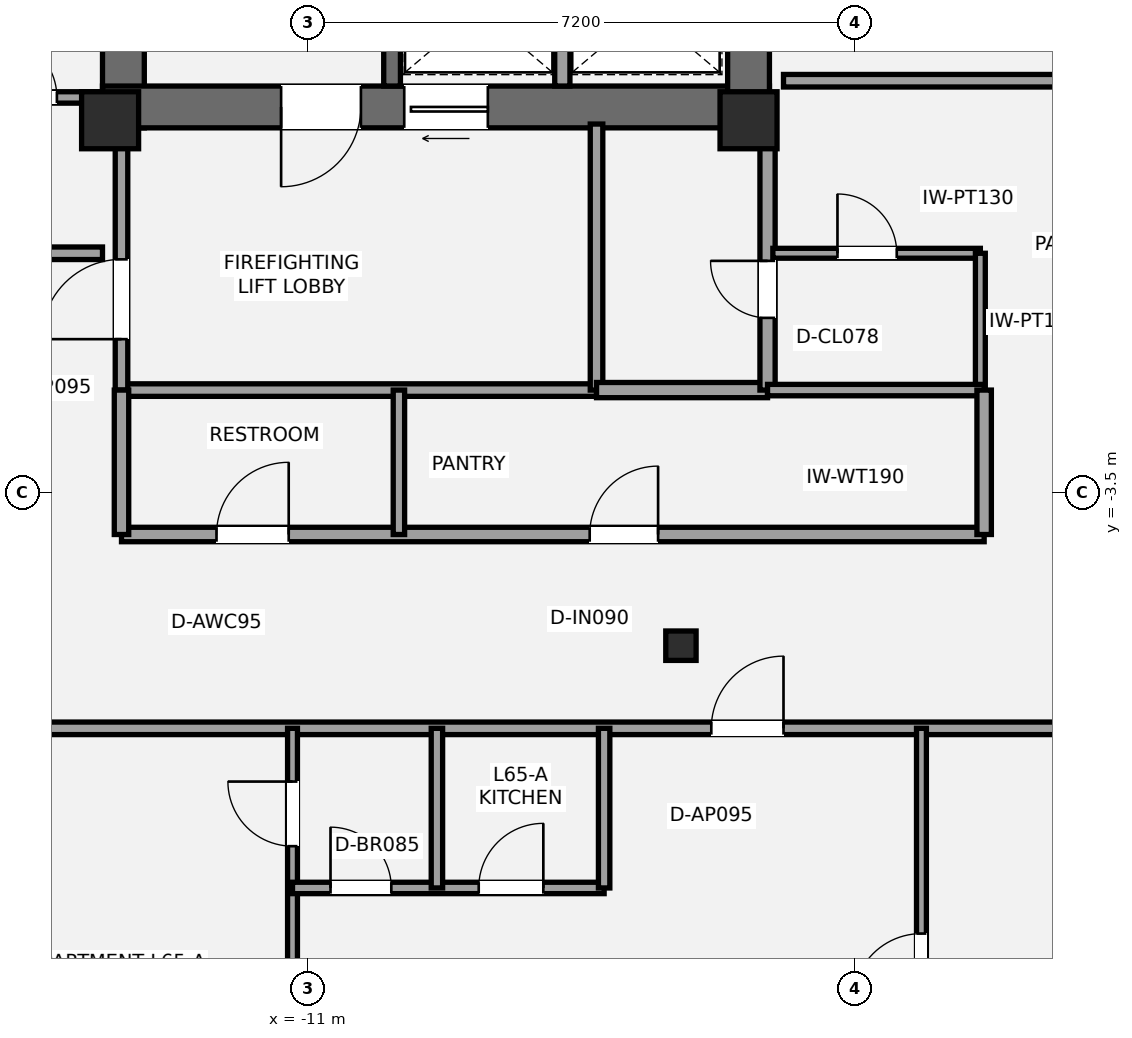
"""IFC4 building model, lengths in metres.
Left out: names, types, materials, properties, quantities, classifications, styles, units other than length and angle.
Written with IfcOpenShell. Run it as: python <this file> out.ifc"""

import sys

from ifc_helpers import new_model, si_unit, direction, frame, frame_2d, origin, origin_2d, place, context, subcontext, project, spatial, rectangle, i_section, extrude, element, fill, save


model = new_model("IFC4")
c1 = context("Model", 3, precision=1e-05, world=origin(), true_north=direction((0.0, 1.0)))
c2 = subcontext(c1, "Body", "Model", "MODEL_VIEW")
j1 = project(units=[si_unit("LENGTHUNIT", "METRE"), si_unit("PLANEANGLEUNIT", "RADIAN")], contexts=[c1])
p1 = place(None, origin())
s1 = spatial("IfcSite", under=j1, at=p1, CompositionType="ELEMENT")
p2 = place(p1, origin())
s2 = spatial("IfcBuilding", under=s1, at=p2, CompositionType="ELEMENT")
p3 = place(p2, frame((0.0, 0.0, 232.05)))
s3 = spatial("IfcBuildingStorey", under=s2, at=p3, CompositionType="ELEMENT", Elevation=232.05)
p4 = place(p3, frame((-13.425, 1.3, 0.0), z_axis=(0.0, 0.0, 1.0), x_axis=(0.0, 1.0, 0.0)))
e1 = element("IfcWall", 1, at=p4, inside=s3, PredefinedType="SHEAR", context=c2, shape_type="SweptSolid", body=[
    extrude(rectangle(XDim=8.25, YDim=0.55, at=frame_2d((4.125, 0.0))), origin(), (0.0, 0.0, 1.0), 3.15),
])
p5 = place(p3, frame((-4.925, 1.575, 0.0), z_axis=(0.0, 0.0, 1.0), x_axis=(-1.0, 0.0, 0.0)))
e2 = element("IfcWall", 2, at=p5, inside=s3, PredefinedType="SHEAR", context=c2, shape_type="SweptSolid", body=[
    extrude(rectangle(XDim=8.775, YDim=0.55, at=frame_2d((4.387, 0.0))), origin(), (0.0, 0.0, 1.0), 3.15),
])
p6 = place(p5, frame((5.375, 0.0, 0.0)))
e3 = element("IfcOpeningElement", 3, at=p6, cuts=e2, PredefinedType="OPENING", context=c2, shape_type="SweptSolid", body=[
    extrude(rectangle(XDim=1.05, YDim=2.15, at=frame_2d((0.525, 1.075))), frame((0.0, 0.285, 0.0), z_axis=(0.0, -1.0, 0.0), x_axis=(1.0, 0.0, 0.0)), (0.0, 0.0, 1.0), 0.57),
])
p7 = place(p5, frame((3.705, 0.0, 0.0)))
e4 = element("IfcOpeningElement", 4, at=p7, cuts=e2, PredefinedType="OPENING", context=c2, shape_type="SweptSolid", body=[
    extrude(rectangle(XDim=1.1, YDim=2.2, at=frame_2d((0.55, 1.1))), frame((0.0, 0.285, 0.0), z_axis=(0.0, -1.0, 0.0), x_axis=(1.0, 0.0, 0.0)), (0.0, 0.0, 1.0), 0.57),
])
p8 = place(p3, frame((-5.2, 1.3, 0.0), z_axis=(0.0, 0.0, 1.0), x_axis=(0.0, 1.0, 0.0)))
e5 = element("IfcWall", 5, at=p8, inside=s3, PredefinedType="SHEAR", context=c2, shape_type="SweptSolid", body=[
    extrude(rectangle(XDim=2.5, YDim=0.55, at=frame_2d((1.25, 0.0))), origin(), (0.0, 0.0, 1.0), 3.15),
])
p9 = place(p3, frame((-9.89, 1.85, 0.0), z_axis=(0.0, 0.0, 1.0), x_axis=(0.0, 1.0, 0.0)))
e6 = element("IfcWall", 6, at=p9, inside=s3, PredefinedType="SHEAR", context=c2, shape_type="SweptSolid", body=[
    extrude(rectangle(XDim=7.15, YDim=0.22, at=frame_2d((3.575, 0.0))), origin(), (0.0, 0.0, 1.0), 3.15),
])
for number, where, z_axis, x_axis in (
    (7, (-13.6, 1.4, 0.0), (0.0, 0.0, 1.0), (1.0, 0.0, 0.0)),
    (8, (-5.2, 1.4, 0.0), (0.0, 0.0, 1.0), (1.0, 0.0, 0.0)),
):
    element("IfcColumn", number, at=place(p3, frame(where, z_axis=z_axis, x_axis=x_axis)), inside=s3, PredefinedType="PILASTER", context=c2, shape_type="SweptSolid", body=[
        extrude(rectangle(XDim=0.75, YDim=0.75, at=origin_2d()), origin(), (0.0, 0.0, 1.0), 3.15),
    ])
p10 = place(p3, frame((-6.09, -5.513, 0.0), z_axis=(0.0, 0.0, 1.0), x_axis=(1.0, 0.0, 0.0)))
e9 = element("IfcColumn", 9, at=p10, inside=s3, PredefinedType="COLUMN", context=c2, shape_type="SweptSolid", body=[
    extrude(i_section(OverallWidth=0.399, OverallDepth=0.387, WebThickness=0.021, FlangeThickness=0.033, at=origin_2d()), origin(), (0.0, 0.0, 1.0), 3.15),
])
p11 = place(p3, frame((-14.159, -11.619, 0.0), z_axis=(0.0, 0.0, 1.0), x_axis=(-0.827641205742, 0.56125754744, 0.0)))
e10 = element("IfcWall", 10, at=p11, inside=s3, PredefinedType="STANDARD", context=c2, shape_type="SweptSolid", body=[
    extrude(rectangle(XDim=3.771, YDim=0.44, at=frame_2d((1.885, 0.0))), origin(), (0.0, 0.0, 1.0), 2.336),
])
p12 = place(p11, frame((1.924, 0.0, 0.58)))
e11 = element("IfcOpeningElement", 11, at=p12, cuts=e10, PredefinedType="OPENING", context=c2, shape_type="SweptSolid", body=[
    extrude(rectangle(XDim=1.4, YDim=1.55, at=frame_2d((0.7, 0.775))), frame((0.0, 0.23, 0.0), z_axis=(0.0, -1.0, 0.0), x_axis=(1.0, 0.0, 0.0)), (0.0, 0.0, 1.0), 0.46),
])
p13 = place(p3, frame((-13.45, -2.15, 0.0), z_axis=(0.0, 0.0, 1.0), x_axis=(1.0, 0.0, 0.0)))
e12 = element("IfcWall", 12, at=p13, inside=s3, PredefinedType="PARTITIONING", context=c2, shape_type="SweptSolid", body=[
    extrude(rectangle(XDim=6.25, YDim=0.165, at=frame_2d((3.125, 0.0))), origin(), (0.0, 0.0, 1.0), 2.423),
])
p14 = place(p3, frame((-13.45, -2.15, 0.0), z_axis=(0.0, 0.0, 1.0), x_axis=(0.0, 1.0, 0.0)))
e13 = element("IfcWall", 13, at=p14, inside=s3, PredefinedType="PARTITIONING", context=c2, shape_type="SweptSolid", body=[
    extrude(rectangle(XDim=3.5, YDim=0.165, at=frame_2d((1.75, 0.0))), origin(), (0.0, 0.0, 1.0), 2.423),
])
p15 = place(p14, frame((0.67, 0.0, 0.0)))
e14 = element("IfcOpeningElement", 14, at=p15, cuts=e13, PredefinedType="OPENING", context=c2, shape_type="SweptSolid", body=[
    extrude(rectangle(XDim=1.05, YDim=2.15, at=frame_2d((0.525, 1.075))), frame((0.0, 0.093, 0.0), z_axis=(0.0, -1.0, 0.0), x_axis=(1.0, 0.0, 0.0)), (0.0, 0.0, 1.0), 0.185),
])
p16 = place(p3, frame((-7.2, -2.15, 0.0), z_axis=(0.0, 0.0, 1.0), x_axis=(0.0, 1.0, 0.0)))
e15 = element("IfcWall", 15, at=p16, inside=s3, PredefinedType="PARTITIONING", context=c2, shape_type="SweptSolid", body=[
    extrude(rectangle(XDim=3.5, YDim=0.165, at=frame_2d((1.75, 0.0))), origin(), (0.0, 0.0, 1.0), 2.423),
])
p17 = place(p3, frame((-7.2, -2.15, 0.0), z_axis=(0.0, 0.0, 1.0), x_axis=(1.0, 0.0, 0.0)))
e16 = element("IfcWall", 16, at=p17, inside=s3, PredefinedType="SOLIDWALL", context=c2, shape_type="SweptSolid", body=[
    extrude(rectangle(XDim=2.25, YDim=0.2, at=frame_2d((1.125, 0.0))), origin(), (0.0, 0.0, 1.0), 2.97),
])
p18 = place(p3, frame((-4.95, -2.15, 0.0), z_axis=(0.0, 0.0, 1.0), x_axis=(0.0, 1.0, 0.0)))
e17 = element("IfcWall", 17, at=p18, inside=s3, PredefinedType="SOLIDWALL", context=c2, shape_type="SweptSolid", body=[
    extrude(rectangle(XDim=3.5, YDim=0.2, at=frame_2d((1.75, 0.0))), origin(), (0.0, 0.0, 1.0), 2.423),
])
p19 = place(p18, frame((0.95, 0.0, 0.0)))
e18 = element("IfcOpeningElement", 18, at=p19, cuts=e17, PredefinedType="OPENING", context=c2, shape_type="SweptSolid", body=[
    extrude(rectangle(XDim=0.75, YDim=2.1, at=frame_2d((0.375, 1.05))), frame((0.0, 0.11, 0.0), z_axis=(0.0, -1.0, 0.0), x_axis=(1.0, 0.0, 0.0)), (0.0, 0.0, 1.0), 0.22),
])
p20 = place(p3, frame((-4.88, -0.35, 0.0), z_axis=(0.0, 0.0, 1.0), x_axis=(1.0, 0.0, 0.0)))
e19 = element("IfcWall", 19, at=p20, inside=s3, PredefinedType="PARTITIONING", context=c2, shape_type="SweptSolid", body=[
    extrude(rectangle(XDim=2.73, YDim=0.13, at=frame_2d((1.365, 0.0))), origin(), (0.0, 0.0, 1.0), 2.97),
])
p21 = place(p20, frame((0.85, 0.0, 0.0)))
e20 = element("IfcOpeningElement", 20, at=p21, cuts=e19, PredefinedType="OPENING", context=c2, shape_type="SweptSolid", body=[
    extrude(rectangle(XDim=0.78, YDim=2.1, at=frame_2d((0.39, 1.05))), frame((0.0, 0.075, 0.0), z_axis=(0.0, -1.0, 0.0), x_axis=(1.0, 0.0, 0.0)), (0.0, 0.0, 1.0), 0.15),
])
p22 = place(p3, frame((-2.15, -2.15, 0.0), z_axis=(0.0, 0.0, 1.0), x_axis=(0.0, 1.0, 0.0)))
e21 = element("IfcWall", 21, at=p22, inside=s3, PredefinedType="PARTITIONING", context=c2, shape_type="SweptSolid", body=[
    extrude(rectangle(XDim=1.8, YDim=0.13, at=frame_2d((0.9, 0.0))), origin(), (0.0, 0.0, 1.0), 2.97),
])
p23 = place(p3, frame((-7.65, 1.85, 0.0), z_axis=(0.0, 0.0, 1.0), x_axis=(0.0, 1.0, 0.0)))
e22 = element("IfcWall", 22, at=p23, inside=s3, PredefinedType="SOLIDWALL", context=c2, shape_type="SweptSolid", body=[
    extrude(rectangle(XDim=1.93, YDim=0.2, at=frame_2d((0.965, 0.0))), origin(), (0.0, 0.0, 1.0), 2.97),
])
p24 = place(p3, frame((-4.74, 1.92, 0.0), z_axis=(0.0, 0.0, 1.0), x_axis=(1.0, 0.0, 0.0)))
e23 = element("IfcWall", 23, at=p24, inside=s3, PredefinedType="PARTITIONING", context=c2, shape_type="SweptSolid", body=[
    extrude(rectangle(XDim=3.89, YDim=0.165, at=frame_2d((1.945, 0.0))), origin(), (0.0, 0.0, 1.0), 2.11),
])
p25 = place(p3, frame((-13.45, -4.05, 0.0), z_axis=(0.0, 0.0, 1.0), x_axis=(1.0, 0.0, 0.0)))
e24 = element("IfcWall", 24, at=p25, inside=s3, PredefinedType="PLUMBINGWALL", context=c2, shape_type="SweptSolid", body=[
    extrude(rectangle(XDim=11.35, YDim=0.19, at=frame_2d((5.675, 0.0))), origin(), (0.0, 0.0, 1.0), 2.357),
])
p26 = place(p25, frame((1.25, 0.0, 0.0)))
e25 = element("IfcOpeningElement", 25, at=p26, cuts=e24, PredefinedType="OPENING", context=c2, shape_type="SweptSolid", body=[
    extrude(rectangle(XDim=0.95, YDim=2.15, at=frame_2d((0.475, 1.075))), frame((0.0, 0.105, 0.0), z_axis=(0.0, -1.0, 0.0), x_axis=(1.0, 0.0, 0.0)), (0.0, 0.0, 1.0), 0.21),
])
p27 = place(p25, frame((6.16, 0.0, 0.0)))
e26 = element("IfcOpeningElement", 26, at=p27, cuts=e24, PredefinedType="OPENING", context=c2, shape_type="SweptSolid", body=[
    extrude(rectangle(XDim=0.9, YDim=2.1, at=frame_2d((0.45, 1.05))), frame((0.0, 0.105, 0.0), z_axis=(0.0, -1.0, 0.0), x_axis=(1.0, 0.0, 0.0)), (0.0, 0.0, 1.0), 0.21),
])
p28 = place(p3, frame((-4.95, -2.15, 0.0), z_axis=(0.0, 0.0, 1.0), x_axis=(1.0, 0.0, 0.0)))
e27 = element("IfcWall", 27, at=p28, inside=s3, PredefinedType="PLUMBINGWALL", context=c2, shape_type="SweptSolid", body=[
    extrude(rectangle(XDim=2.85, YDim=0.15, at=frame_2d((1.425, 0.0))), origin(), (0.0, 0.0, 1.0), 2.97),
])
for number, where, z_axis, x_axis in (
    (28, (-13.45, -4.05, 0.0), (0.0, 0.0, 1.0), (0.0, 1.0, 0.0)),
    (29, (-2.1, -4.05, 0.0), (0.0, 0.0, 1.0), (0.0, 1.0, 0.0)),
):
    element("IfcWall", number, at=place(p3, frame(where, z_axis=z_axis, x_axis=x_axis)), inside=s3, PredefinedType="PLUMBINGWALL", context=c2, shape_type="SweptSolid", body=[
        extrude(rectangle(XDim=1.9, YDim=0.19, at=frame_2d((0.95, 0.0))), origin(), (0.0, 0.0, 1.0), 2.423),
    ])
p29 = place(p3, frame((-9.8, -4.05, 0.0), z_axis=(0.0, 0.0, 1.0), x_axis=(0.0, 1.0, 0.0)))
e30 = element("IfcWall", 30, at=p29, inside=s3, PredefinedType="PLUMBINGWALL", context=c2, shape_type="SweptSolid", body=[
    extrude(rectangle(XDim=1.9, YDim=0.15, at=frame_2d((0.95, 0.0))), origin(), (0.0, 0.0, 1.0), 2.97),
])
p30 = place(p3, frame((-19.638, -6.6, 0.0), z_axis=(0.0, 0.0, 1.0), x_axis=(1.0, 0.0, 0.0)))
e31 = element("IfcWall", 31, at=p30, inside=s3, PredefinedType="PARTITIONING", context=c2, shape_type="SweptSolid", body=[
    extrude(rectangle(XDim=39.277, YDim=0.165, at=frame_2d((19.638, 0.0))), origin(), (0.0, 0.0, 1.0), 2.423),
])
p31 = place(p30, frame((1.229, 0.0, 0.0)))
e32 = element("IfcOpeningElement", 32, at=p31, cuts=e31, PredefinedType="OPENING", context=c2, shape_type="SweptSolid", body=[
    extrude(rectangle(XDim=1.0, YDim=2.15, at=frame_2d((0.5, 1.075))), frame((0.0, 0.093, 0.0), z_axis=(0.0, -1.0, 0.0), x_axis=(1.0, 0.0, 0.0)), (0.0, 0.0, 1.0), 0.185),
])
p32 = place(p30, frame((37.393, 0.0, 0.0)))
e33 = element("IfcOpeningElement", 33, at=p32, cuts=e31, PredefinedType="OPENING", context=c2, shape_type="SweptSolid", body=[
    extrude(rectangle(XDim=1.0, YDim=2.15, at=frame_2d((0.5, 1.075))), frame((0.0, 0.093, 0.0), z_axis=(0.0, -1.0, 0.0), x_axis=(1.0, 0.0, 0.0)), (0.0, 0.0, 1.0), 0.185),
])
p33 = place(p30, frame((13.948, 0.0, 0.0)))
e34 = element("IfcOpeningElement", 34, at=p33, cuts=e31, PredefinedType="OPENING", context=c2, shape_type="SweptSolid", body=[
    extrude(rectangle(XDim=0.95, YDim=2.15, at=frame_2d((0.475, 1.075))), frame((0.0, 0.093, 0.0), z_axis=(0.0, -1.0, 0.0), x_axis=(1.0, 0.0, 0.0)), (0.0, 0.0, 1.0), 0.185),
])
p34 = place(p30, frame((30.738, 0.0, 0.0)))
e35 = element("IfcOpeningElement", 35, at=p34, cuts=e31, PredefinedType="OPENING", context=c2, shape_type="SweptSolid", body=[
    extrude(rectangle(XDim=0.95, YDim=2.15, at=frame_2d((0.475, 1.075))), frame((0.0, 0.093, 0.0), z_axis=(0.0, -1.0, 0.0), x_axis=(1.0, 0.0, 0.0)), (0.0, 0.0, 1.0), 0.185),
])
p35 = place(p3, frame((-15.55, -0.35, 0.0), z_axis=(0.0, 0.0, 1.0), x_axis=(1.0, 0.0, 0.0)))
e36 = element("IfcWall", 36, at=p35, inside=s3, PredefinedType="PARTITIONING", context=c2, shape_type="SweptSolid", body=[
    extrude(rectangle(XDim=1.85, YDim=0.165, at=frame_2d((0.925, 0.0))), origin(), (0.0, 0.0, 1.0), 2.97),
])
p36 = place(p3, frame((-11.2, -12.678, 0.0), z_axis=(0.0, 0.0, 1.0), x_axis=(0.0, 1.0, 0.0)))
e37 = element("IfcWall", 37, at=p36, inside=s3, PredefinedType="PARTITIONING", context=c2, shape_type="SweptSolid", body=[
    extrude(rectangle(XDim=6.078, YDim=0.13, at=frame_2d((3.039, 0.0))), origin(), (0.0, 0.0, 1.0), 2.423),
])
p37 = place(p36, frame((4.527, 0.0, 0.0)))
e38 = element("IfcOpeningElement", 38, at=p37, cuts=e37, PredefinedType="OPENING", context=c2, shape_type="SweptSolid", body=[
    extrude(rectangle(XDim=0.85, YDim=2.1, at=frame_2d((0.425, 1.05))), frame((0.0, 0.075, 0.0), z_axis=(0.0, -1.0, 0.0), x_axis=(1.0, 0.0, 0.0)), (0.0, 0.0, 1.0), 0.15),
])
p38 = place(p3, frame((-11.2, -8.7, 0.0), z_axis=(0.0, 0.0, 1.0), x_axis=(1.0, 0.0, 0.0)))
e39 = element("IfcWall", 39, at=p38, inside=s3, PredefinedType="PLUMBINGWALL", context=c2, shape_type="SweptSolid", body=[
    extrude(rectangle(XDim=4.1, YDim=0.15, at=frame_2d((2.05, 0.0))), origin(), (0.0, 0.0, 1.0), 2.423),
])
p39 = place(p38, frame((0.5, 0.0, 0.0)))
e40 = element("IfcOpeningElement", 40, at=p39, cuts=e39, PredefinedType="OPENING", context=c2, shape_type="SweptSolid", body=[
    extrude(rectangle(XDim=0.8, YDim=2.1, at=frame_2d((0.4, 1.05))), frame((0.0, 0.085, 0.0), z_axis=(0.0, -1.0, 0.0), x_axis=(1.0, 0.0, 0.0)), (0.0, 0.0, 1.0), 0.17),
])
p40 = place(p38, frame((2.45, 0.0, 0.0)))
e41 = element("IfcOpeningElement", 41, at=p40, cuts=e39, PredefinedType="OPENING", context=c2, shape_type="SweptSolid", body=[
    extrude(rectangle(XDim=0.85, YDim=2.1, at=frame_2d((0.425, 1.05))), frame((0.0, 0.085, 0.0), z_axis=(0.0, -1.0, 0.0), x_axis=(1.0, 0.0, 0.0)), (0.0, 0.0, 1.0), 0.17),
])
p41 = place(p3, frame((-9.3, -8.7, 0.0), z_axis=(0.0, 0.0, 1.0), x_axis=(0.0, 1.0, 0.0)))
e42 = element("IfcWall", 42, at=p41, inside=s3, PredefinedType="PLUMBINGWALL", context=c2, shape_type="SweptSolid", body=[
    extrude(rectangle(XDim=2.1, YDim=0.15, at=frame_2d((1.05, 0.0))), origin(), (0.0, 0.0, 1.0), 2.97),
])
p42 = place(p3, frame((-7.1, -8.7, 0.0), z_axis=(0.0, 0.0, 1.0), x_axis=(0.0, 1.0, 0.0)))
e43 = element("IfcWall", 43, at=p42, inside=s3, PredefinedType="PLUMBINGWALL", context=c2, shape_type="SweptSolid", body=[
    extrude(rectangle(XDim=2.1, YDim=0.15, at=frame_2d((1.05, 0.0))), origin(), (0.0, 0.0, 1.0), 2.423),
])
p43 = place(p3, frame((-2.925, -14.55, 0.0), z_axis=(0.0, 0.0, 1.0), x_axis=(0.0, 1.0, 0.0)))
e44 = element("IfcWall", 44, at=p43, inside=s3, PredefinedType="PARTITIONING", context=c2, shape_type="SweptSolid", body=[
    extrude(rectangle(XDim=7.949, YDim=0.13, at=frame_2d((3.975, 0.0))), origin(), (0.0, 0.0, 1.0), 2.423),
])
p44 = place(p43, frame((4.349, 0.0, 0.0)))
e45 = element("IfcOpeningElement", 45, at=p44, cuts=e44, PredefinedType="OPENING", context=c2, shape_type="SweptSolid", body=[
    extrude(rectangle(XDim=0.9, YDim=2.1, at=frame_2d((0.45, 1.05))), frame((0.0, 0.075, 0.0), z_axis=(0.0, -1.0, 0.0), x_axis=(1.0, 0.0, 0.0)), (0.0, 0.0, 1.0), 0.15),
])
p45 = place(p3, frame((-17.95, 1.7, 0.0), z_axis=(0.0, 0.0, 1.0), x_axis=(1.0, 0.0, 0.0)))
e46 = element("IfcWall", 46, at=p45, inside=s3, PredefinedType="PLUMBINGWALL", context=c2, shape_type="SweptSolid", body=[
    extrude(rectangle(XDim=4.25, YDim=0.15, at=frame_2d((2.125, 0.0))), origin(), (0.0, 0.0, 1.0), 2.423),
])
p46 = place(p45, frame((2.85, 0.0, 0.0)))
e47 = element("IfcOpeningElement", 47, at=p46, cuts=e46, PredefinedType="OPENING", context=c2, shape_type="SweptSolid", body=[
    extrude(rectangle(XDim=0.8, YDim=2.1, at=frame_2d((0.4, 1.05))), frame((0.0, 0.085, 0.0), z_axis=(0.0, -1.0, 0.0), x_axis=(1.0, 0.0, 0.0)), (0.0, 0.0, 1.0), 0.17),
])
p47 = place(p45, frame((1.27, 0.0, 0.0)))
e48 = element("IfcOpeningElement", 48, at=p47, cuts=e46, PredefinedType="OPENING", context=c2, shape_type="SweptSolid", body=[
    extrude(rectangle(XDim=0.85, YDim=2.1, at=frame_2d((0.425, 1.05))), frame((0.0, 0.085, 0.0), z_axis=(0.0, -1.0, 0.0), x_axis=(1.0, 0.0, 0.0)), (0.0, 0.0, 1.0), 0.17),
])
p48 = place(p6, origin())
e49 = element("IfcDoor", 49, at=p48, inside=s3, OperationType="SINGLE_SWING_RIGHT", PredefinedType="DOOR", context=c2, shape_type="SweptSolid", body=[
    extrude(rectangle(XDim=1.05, YDim=2.15, at=frame_2d((0.525, 1.075))), frame((0.0, 0.025, 0.0), z_axis=(0.0, -1.0, 0.0), x_axis=(1.0, 0.0, 0.0)), (0.0, 0.0, 1.0), 0.05),
])
fill(e3, e49)
p49 = place(p15, origin())
e50 = element("IfcDoor", 50, at=p49, inside=s3, OperationType="SINGLE_SWING_LEFT", PredefinedType="DOOR", context=c2, shape_type="SweptSolid", body=[
    extrude(rectangle(XDim=1.05, YDim=2.15, at=frame_2d((0.525, 1.075))), frame((0.0, 0.025, 0.0), z_axis=(0.0, -1.0, 0.0), x_axis=(1.0, 0.0, 0.0)), (0.0, 0.0, 1.0), 0.05),
])
fill(e14, e50)
p50 = place(p19, origin())
e51 = element("IfcDoor", 51, at=p50, inside=s3, OperationType="SINGLE_SWING_RIGHT", PredefinedType="DOOR", context=c2, shape_type="SweptSolid", body=[
    extrude(rectangle(XDim=0.75, YDim=2.1, at=frame_2d((0.375, 1.05))), frame((0.0, 0.025, 0.0), z_axis=(0.0, -1.0, 0.0), x_axis=(1.0, 0.0, 0.0)), (0.0, 0.0, 1.0), 0.05),
])
fill(e18, e51)
p51 = place(p21, origin())
e52 = element("IfcDoor", 52, at=p51, inside=s3, OperationType="SINGLE_SWING_LEFT", PredefinedType="DOOR", context=c2, shape_type="SweptSolid", body=[
    extrude(rectangle(XDim=0.78, YDim=2.1, at=frame_2d((0.39, 1.05))), frame((0.0, 0.025, 0.0), z_axis=(0.0, -1.0, 0.0), x_axis=(1.0, 0.0, 0.0)), (0.0, 0.0, 1.0), 0.05),
])
fill(e20, e52)
p52 = place(p7, origin())
e53 = element("IfcDoor", 53, at=p52, inside=s3, OperationType="SLIDING_TO_LEFT", PredefinedType="DOOR", context=c2, shape_type="SweptSolid", body=[
    extrude(rectangle(XDim=1.1, YDim=2.2, at=frame_2d((0.55, 1.1))), frame((0.0, 0.025, 0.0), z_axis=(0.0, -1.0, 0.0), x_axis=(1.0, 0.0, 0.0)), (0.0, 0.0, 1.0), 0.05),
])
fill(e4, e53)
p53 = place(p26, origin())
e54 = element("IfcDoor", 54, at=p53, inside=s3, OperationType="SINGLE_SWING_RIGHT", PredefinedType="DOOR", context=c2, shape_type="SweptSolid", body=[
    extrude(rectangle(XDim=0.95, YDim=2.15, at=frame_2d((0.475, 1.075))), frame((0.0, 0.025, 0.0), z_axis=(0.0, -1.0, 0.0), x_axis=(1.0, 0.0, 0.0)), (0.0, 0.0, 1.0), 0.05),
])
fill(e25, e54)
p54 = place(p27, origin())
e55 = element("IfcDoor", 55, at=p54, inside=s3, OperationType="SINGLE_SWING_RIGHT", PredefinedType="DOOR", context=c2, shape_type="SweptSolid", body=[
    extrude(rectangle(XDim=0.9, YDim=2.1, at=frame_2d((0.45, 1.05))), frame((0.0, 0.025, 0.0), z_axis=(0.0, -1.0, 0.0), x_axis=(1.0, 0.0, 0.0)), (0.0, 0.0, 1.0), 0.05),
])
fill(e26, e55)
p55 = place(p37, origin())
e56 = element("IfcDoor", 56, at=p55, inside=s3, OperationType="SINGLE_SWING_RIGHT", PredefinedType="DOOR", context=c2, shape_type="SweptSolid", body=[
    extrude(rectangle(XDim=0.85, YDim=2.1, at=frame_2d((0.425, 1.05))), frame((0.0, 0.025, 0.0), z_axis=(0.0, -1.0, 0.0), x_axis=(1.0, 0.0, 0.0)), (0.0, 0.0, 1.0), 0.05),
])
fill(e38, e56)
p56 = place(p39, origin())
e57 = element("IfcDoor", 57, at=p56, inside=s3, OperationType="SINGLE_SWING_LEFT", PredefinedType="DOOR", context=c2, shape_type="SweptSolid", body=[
    extrude(rectangle(XDim=0.8, YDim=2.1, at=frame_2d((0.4, 1.05))), frame((0.0, 0.025, 0.0), z_axis=(0.0, -1.0, 0.0), x_axis=(1.0, 0.0, 0.0)), (0.0, 0.0, 1.0), 0.05),
])
fill(e40, e57)
p57 = place(p40, origin())
e58 = element("IfcDoor", 58, at=p57, inside=s3, OperationType="SINGLE_SWING_RIGHT", PredefinedType="DOOR", context=c2, shape_type="SweptSolid", body=[
    extrude(rectangle(XDim=0.85, YDim=2.1, at=frame_2d((0.425, 1.05))), frame((0.0, 0.025, 0.0), z_axis=(0.0, -1.0, 0.0), x_axis=(1.0, 0.0, 0.0)), (0.0, 0.0, 1.0), 0.05),
])
fill(e41, e58)
p58 = place(p33, origin())
e59 = element("IfcDoor", 59, at=p58, inside=s3, OperationType="SINGLE_SWING_RIGHT", PredefinedType="DOOR", context=c2, shape_type="SweptSolid", body=[
    extrude(rectangle(XDim=0.95, YDim=2.15, at=frame_2d((0.475, 1.075))), frame((0.0, 0.025, 0.0), z_axis=(0.0, -1.0, 0.0), x_axis=(1.0, 0.0, 0.0)), (0.0, 0.0, 1.0), 0.05),
])
fill(e34, e59)
p59 = place(p44, origin())
e60 = element("IfcDoor", 60, at=p59, inside=s3, OperationType="SINGLE_SWING_LEFT", PredefinedType="DOOR", context=c2, shape_type="SweptSolid", body=[
    extrude(rectangle(XDim=0.9, YDim=2.1, at=frame_2d((0.45, 1.05))), frame((0.0, 0.025, 0.0), z_axis=(0.0, -1.0, 0.0), x_axis=(1.0, 0.0, 0.0)), (0.0, 0.0, 1.0), 0.05),
])
fill(e45, e60)
p60 = place(p46, origin())
e61 = element("IfcDoor", 61, at=p60, inside=s3, OperationType="SINGLE_SWING_LEFT", PredefinedType="DOOR", context=c2, shape_type="SweptSolid", body=[
    extrude(rectangle(XDim=0.8, YDim=2.1, at=frame_2d((0.4, 1.05))), frame((0.0, 0.025, 0.0), z_axis=(0.0, -1.0, 0.0), x_axis=(1.0, 0.0, 0.0)), (0.0, 0.0, 1.0), 0.05),
])
fill(e47, e61)
save(model, sys.argv[1])
